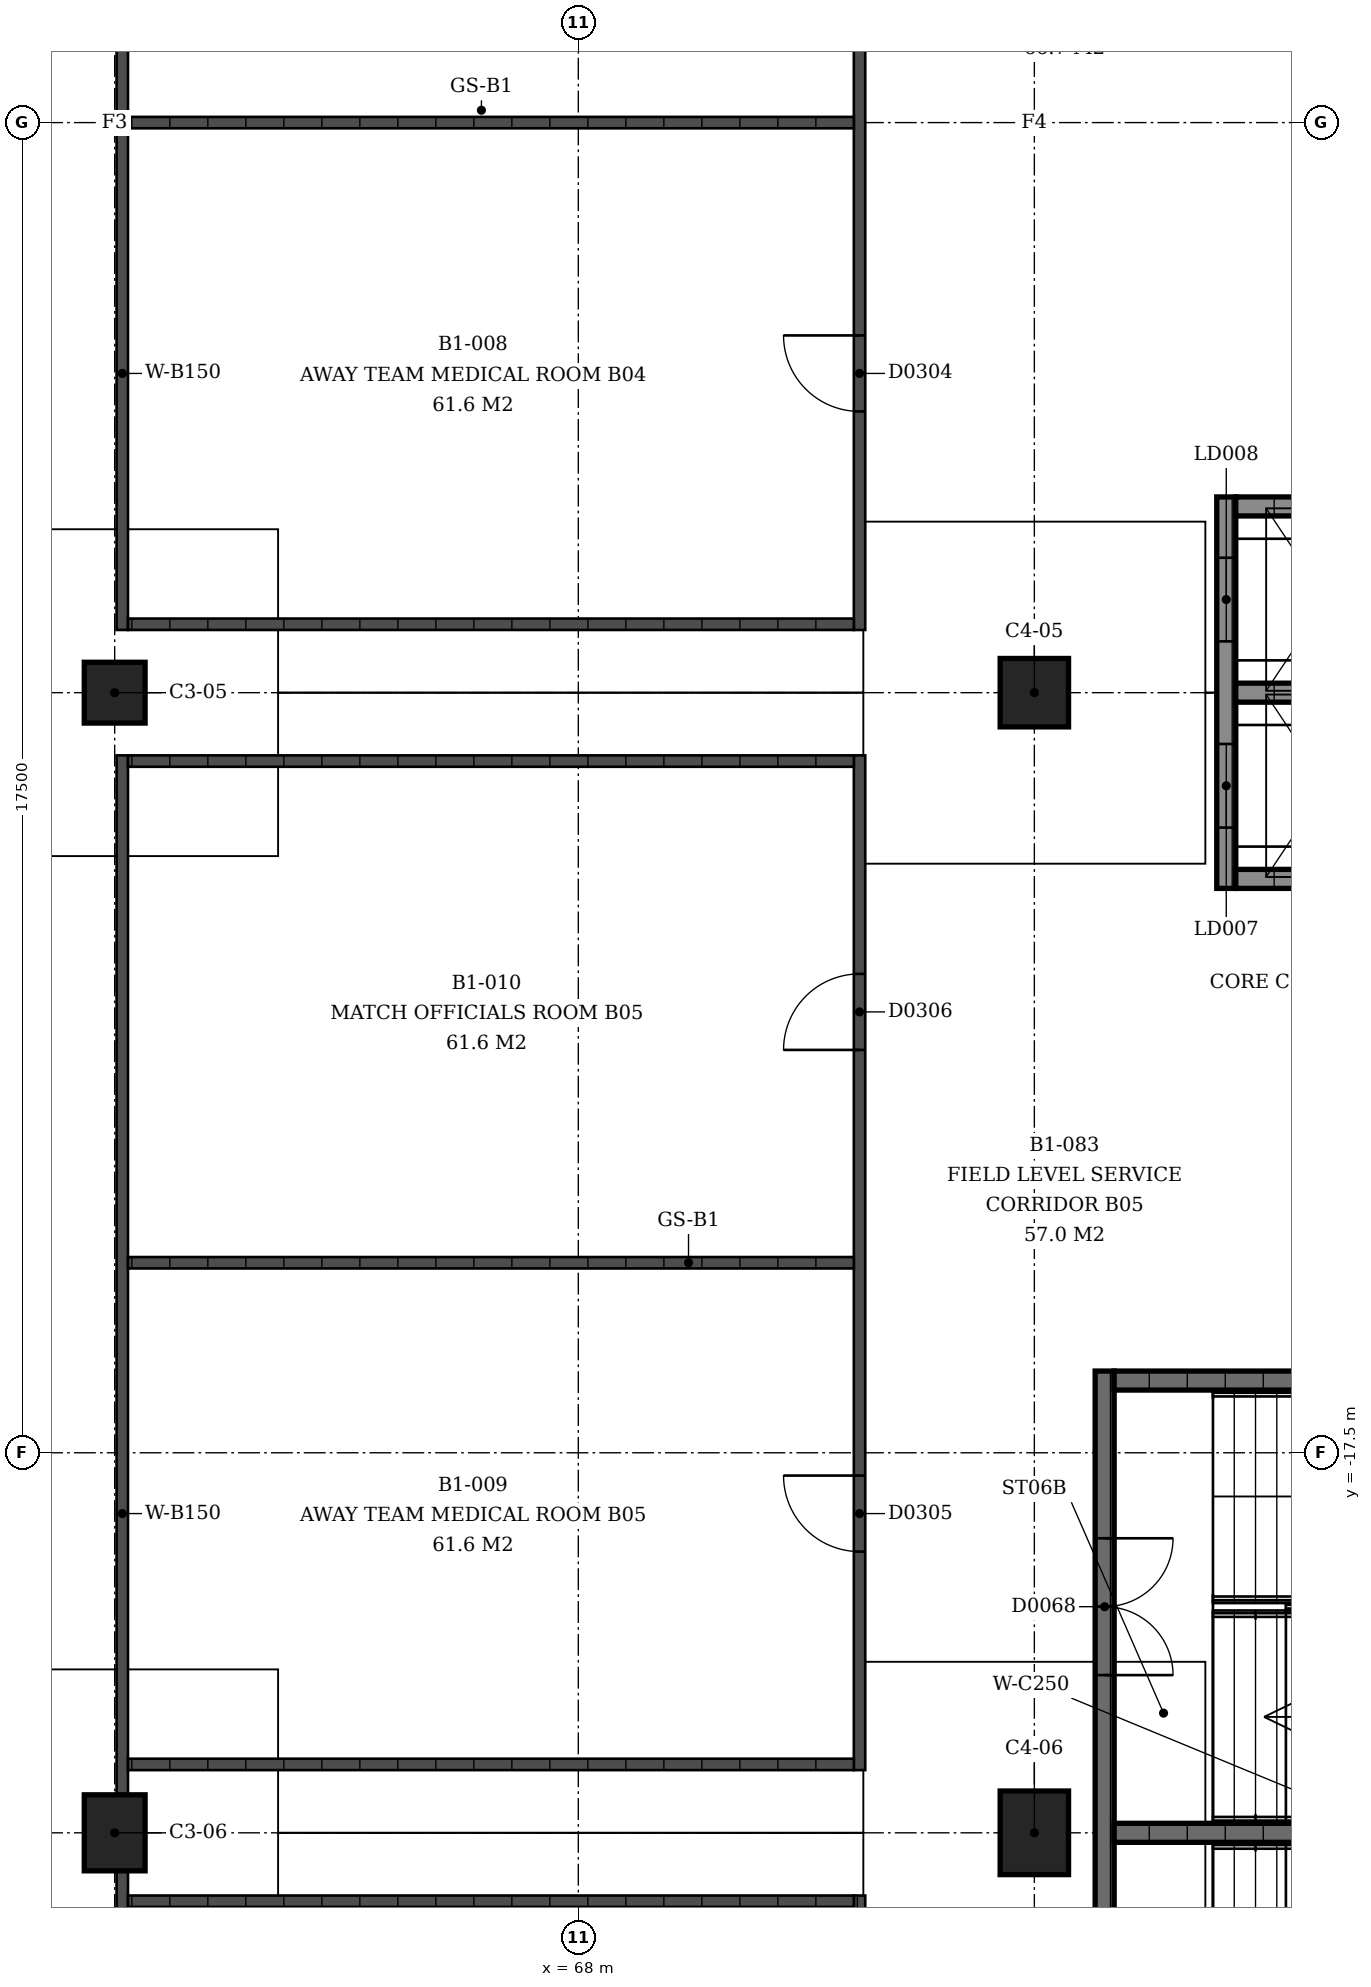
"""IFC4 building model, lengths in metres.
Left out: names, types, materials, properties, quantities, classifications, styles, units other than length and angle.
Written with IfcOpenShell. Run it as: python <this file> out.ifc"""

import sys

from ifc_helpers import new_model, si_unit, direction, frame, frame_2d, origin, origin_2d, place, context, subcontext, project, spatial, rectangle, extrude, element, fill, save


model = new_model("IFC4")
c1 = context("Model", 3, precision=1e-05, world=origin(), true_north=direction((0.0, 1.0)))
c2 = subcontext(c1, "Body", "Model", "MODEL_VIEW")
j1 = project(units=[si_unit("LENGTHUNIT", "METRE"), si_unit("PLANEANGLEUNIT", "RADIAN")], contexts=[c1])
p1 = place(None, origin())
s1 = spatial("IfcSite", under=j1, at=p1, CompositionType="ELEMENT")
p2 = place(p1, origin())
s2 = spatial("IfcBuilding", under=s1, at=p2, CompositionType="ELEMENT")
p3 = place(p2, frame((0.0, 0.0, -4.5)))
s3 = spatial("IfcBuildingStorey", under=s2, at=p3, CompositionType="ELEMENT", Elevation=-4.5)
p4 = place(p3, frame((61.9, -7.5, 0.0), z_axis=(0.0, 0.0, 1.0), x_axis=(0.0, 1.0, 0.0)))
e1 = element("IfcColumn", 1, at=p4, inside=s3, PredefinedType="COLUMN", context=c2, shape_type="SweptSolid", body=[
    extrude(rectangle(XDim=0.8, YDim=0.8, at=origin_2d()), origin(), (0.0, 0.0, 1.0), 4.5),
])
p5 = place(p3, frame((74.0, -7.5, 0.0), z_axis=(0.0, 0.0, 1.0), x_axis=(0.0, 1.0, 0.0)))
e2 = element("IfcColumn", 2, at=p5, inside=s3, PredefinedType="COLUMN", context=c2, shape_type="SweptSolid", body=[
    extrude(rectangle(XDim=0.9, YDim=0.9, at=origin_2d()), origin(), (0.0, 0.0, 1.0), 4.5),
])
p6 = place(p3, frame((61.9, -22.5, 0.0), z_axis=(0.0, 0.0, 1.0), x_axis=(0.0, 1.0, 0.0)))
e3 = element("IfcColumn", 3, at=p6, inside=s3, PredefinedType="COLUMN", context=c2, shape_type="SweptSolid", body=[
    extrude(rectangle(XDim=1.0, YDim=0.8, at=origin_2d()), origin(), (0.0, 0.0, 1.0), 4.5),
])
p7 = place(p3, frame((74.0, -22.5, 0.0), z_axis=(0.0, 0.0, 1.0), x_axis=(0.0, 1.0, 0.0)))
e4 = element("IfcColumn", 4, at=p7, inside=s3, PredefinedType="COLUMN", context=c2, shape_type="SweptSolid", body=[
    extrude(rectangle(XDim=1.1, YDim=0.9, at=origin_2d()), origin(), (0.0, 0.0, 1.0), 4.5),
])
p8 = place(p3, frame((74.925, -28.575, 0.0), z_axis=(0.0, 0.0, 1.0), x_axis=(0.0, 1.0, 0.0)))
e5 = element("IfcWall", 5, at=p8, inside=s3, PredefinedType="SHEAR", context=c2, shape_type="SweptSolid", body=[
    extrude(rectangle(XDim=12.15, YDim=0.25, at=frame_2d((6.075, 0.0))), origin(), (0.0, 0.0, 1.0), 4.09),
])
p9 = place(p8, frame((2.2, 0.0, 0.0)))
e6 = element("IfcOpeningElement", 6, at=p9, cuts=e5, PredefinedType="OPENING", context=c2, shape_type="SweptSolid", body=[
    extrude(rectangle(XDim=1.8, YDim=2.1, at=frame_2d((0.9, 1.05))), frame((0.0, 0.125, 0.0), z_axis=(0.0, -1.0, 0.0), x_axis=(1.0, 0.0, 0.0)), (0.0, 0.0, 1.0), 0.25),
])
p10 = place(p8, frame((8.15, 0.0, 0.0)))
e7 = element("IfcOpeningElement", 7, at=p10, cuts=e5, PredefinedType="OPENING", context=c2, shape_type="SweptSolid", body=[
    extrude(rectangle(XDim=1.8, YDim=2.1, at=frame_2d((0.9, 1.05))), frame((0.0, 0.125, 0.0), z_axis=(0.0, -1.0, 0.0), x_axis=(1.0, 0.0, 0.0)), (0.0, 0.0, 1.0), 0.25),
])
for number, where, z_axis, x_axis in (
    (8, (75.05, -16.55, 0.0), (0.0, 0.0, 1.0), (1.0, 0.0, 0.0)),
    (9, (75.05, -22.5, 0.0), (0.0, 0.0, 1.0), (1.0, 0.0, 0.0)),
):
    element("IfcWall", number, at=place(p3, frame(where, z_axis=z_axis, x_axis=x_axis)), inside=s3, PredefinedType="SHEAR", context=c2, shape_type="SweptSolid", body=[
        extrude(rectangle(XDim=7.46, YDim=0.25, at=frame_2d((3.73, 0.0))), origin(), (0.0, 0.0, 1.0), 4.09),
    ])
p11 = place(p3, frame((76.525, -10.075, -1.2), z_axis=(0.0, 0.0, 1.0), x_axis=(0.0, 1.0, 0.0)))
e10 = element("IfcWall", 10, at=p11, inside=s3, PredefinedType="SHEAR", context=c2, shape_type="SweptSolid", body=[
    extrude(rectangle(XDim=5.15, YDim=0.25, at=frame_2d((2.575, 0.0))), origin(), (0.0, 0.0, 1.0), 5.29),
])
p12 = place(p11, frame((0.8, 0.0, 1.2)))
e11 = element("IfcOpeningElement", 11, at=p12, cuts=e10, PredefinedType="OPENING", context=c2, shape_type="SweptSolid", body=[
    extrude(rectangle(XDim=1.1, YDim=2.1, at=frame_2d((0.55, 1.05))), frame((0.0, 0.125, 0.0), z_axis=(0.0, -1.0, 0.0), x_axis=(1.0, 0.0, 0.0)), (0.0, 0.0, 1.0), 0.25),
])
p13 = place(p11, frame((3.25, 0.0, 1.2)))
e12 = element("IfcOpeningElement", 12, at=p13, cuts=e10, PredefinedType="OPENING", context=c2, shape_type="SweptSolid", body=[
    extrude(rectangle(XDim=1.1, YDim=2.1, at=frame_2d((0.55, 1.05))), frame((0.0, 0.125, 0.0), z_axis=(0.0, -1.0, 0.0), x_axis=(1.0, 0.0, 0.0)), (0.0, 0.0, 1.0), 0.25),
])
for number, where, z_axis, x_axis in (
    (13, (76.65, -9.95, -1.2), (0.0, 0.0, 1.0), (1.0, 0.0, 0.0)),
    (14, (76.65, -5.05, -1.2), (0.0, 0.0, 1.0), (1.0, 0.0, 0.0)),
    (15, (76.65, -7.5, -1.2), (0.0, 0.0, 1.0), (1.0, 0.0, 0.0)),
):
    element("IfcWall", number, at=place(p3, frame(where, z_axis=z_axis, x_axis=x_axis)), inside=s3, PredefinedType="SHEAR", context=c2, shape_type="SweptSolid", body=[
        extrude(rectangle(XDim=3.0, YDim=0.25, at=frame_2d((1.5, 0.0))), origin(), (0.0, 0.0, 1.0), 5.29),
    ])
p14 = place(p3, frame((62.0, 7.0, 0.0), z_axis=(0.0, 0.0, 1.0), x_axis=(0.0, -1.0, 0.0)))
e16 = element("IfcWall", 16, at=p14, inside=s3, PredefinedType="SOLIDWALL", context=c2, shape_type="SweptSolid", body=[
    extrude(rectangle(XDim=13.675, YDim=0.15, at=frame_2d((6.837, 0.0))), origin(), (0.0, 0.0, 1.0), 3.0),
])
p15 = place(p3, frame((71.7, 6.675, 0.0), z_axis=(0.0, 0.0, 1.0), x_axis=(0.0, -1.0, 0.0)))
e17 = element("IfcWall", 17, at=p15, inside=s3, PredefinedType="SOLIDWALL", context=c2, shape_type="SweptSolid", body=[
    extrude(rectangle(XDim=13.35, YDim=0.15, at=frame_2d((6.675, 0.0))), origin(), (0.0, 0.0, 1.0), 3.0),
])
p16 = place(p15, frame((2.875, 0.0, 0.0)))
e18 = element("IfcOpeningElement", 18, at=p16, cuts=e17, PredefinedType="OPENING", context=c2, shape_type="SweptSolid", body=[
    extrude(rectangle(XDim=1.0, YDim=2.1, at=frame_2d((0.5, 1.05))), frame((0.0, 0.075, 0.0), z_axis=(0.0, -1.0, 0.0), x_axis=(1.0, 0.0, 0.0)), (0.0, 0.0, 1.0), 0.15),
])
p17 = place(p15, frame((9.475, 0.0, 0.0)))
e19 = element("IfcOpeningElement", 19, at=p17, cuts=e17, PredefinedType="OPENING", context=c2, shape_type="SweptSolid", body=[
    extrude(rectangle(XDim=1.0, YDim=2.1, at=frame_2d((0.5, 1.05))), frame((0.0, 0.075, 0.0), z_axis=(0.0, -1.0, 0.0), x_axis=(1.0, 0.0, 0.0)), (0.0, 0.0, 1.0), 0.15),
])
for number, where, z_axis, x_axis in (
    (20, (62.075, 0.0, 0.0), (0.0, 0.0, 1.0), (1.0, 0.0, 0.0)),
    (21, (62.075, -6.6, 0.0), (0.0, 0.0, 1.0), (1.0, 0.0, 0.0)),
):
    element("IfcWall", number, at=place(p3, frame(where, z_axis=z_axis, x_axis=x_axis)), inside=s3, PredefinedType="SOLIDWALL", context=c2, shape_type="SweptSolid", body=[
        extrude(rectangle(XDim=9.55, YDim=0.15, at=frame_2d((4.775, 0.0))), origin(), (0.0, 0.0, 1.0), 3.0),
    ])
p18 = place(p3, frame((62.0, -22.0, 0.0), z_axis=(0.0, 0.0, 1.0), x_axis=(0.0, 1.0, 0.0)))
e22 = element("IfcWall", 22, at=p18, inside=s3, PredefinedType="SOLIDWALL", context=c2, shape_type="SweptSolid", body=[
    extrude(rectangle(XDim=13.675, YDim=0.15, at=frame_2d((6.837, 0.0))), origin(), (0.0, 0.0, 1.0), 3.0),
])
p19 = place(p3, frame((71.7, -21.675, 0.0), z_axis=(0.0, 0.0, 1.0), x_axis=(0.0, 1.0, 0.0)))
e23 = element("IfcWall", 23, at=p19, inside=s3, PredefinedType="SOLIDWALL", context=c2, shape_type="SweptSolid", body=[
    extrude(rectangle(XDim=13.35, YDim=0.15, at=frame_2d((6.675, 0.0))), origin(), (0.0, 0.0, 1.0), 3.0),
])
p20 = place(p19, frame((2.875, 0.0, 0.0)))
e24 = element("IfcOpeningElement", 24, at=p20, cuts=e23, PredefinedType="OPENING", context=c2, shape_type="SweptSolid", body=[
    extrude(rectangle(XDim=1.0, YDim=2.1, at=frame_2d((0.5, 1.05))), frame((0.0, 0.075, 0.0), z_axis=(0.0, -1.0, 0.0), x_axis=(1.0, 0.0, 0.0)), (0.0, 0.0, 1.0), 0.15),
])
p21 = place(p19, frame((9.475, 0.0, 0.0)))
e25 = element("IfcOpeningElement", 25, at=p21, cuts=e23, PredefinedType="OPENING", context=c2, shape_type="SweptSolid", body=[
    extrude(rectangle(XDim=1.0, YDim=2.1, at=frame_2d((0.5, 1.05))), frame((0.0, 0.075, 0.0), z_axis=(0.0, -1.0, 0.0), x_axis=(1.0, 0.0, 0.0)), (0.0, 0.0, 1.0), 0.15),
])
for number, where, z_axis, x_axis in (
    (26, (62.075, -21.6, 0.0), (0.0, 0.0, 1.0), (1.0, 0.0, 0.0)),
    (27, (62.075, -15.0, 0.0), (0.0, 0.0, 1.0), (1.0, 0.0, 0.0)),
    (28, (62.075, -8.4, 0.0), (0.0, 0.0, 1.0), (1.0, 0.0, 0.0)),
):
    element("IfcWall", number, at=place(p3, frame(where, z_axis=z_axis, x_axis=x_axis)), inside=s3, PredefinedType="SOLIDWALL", context=c2, shape_type="SweptSolid", body=[
        extrude(rectangle(XDim=9.55, YDim=0.15, at=frame_2d((4.775, 0.0))), origin(), (0.0, 0.0, 1.0), 3.0),
    ])
p22 = place(p3, frame((62.0, -23.0, 0.0), z_axis=(0.0, 0.0, 1.0), x_axis=(0.0, -1.0, 0.0)))
e29 = element("IfcWall", 29, at=p22, inside=s3, PredefinedType="SOLIDWALL", context=c2, shape_type="SweptSolid", body=[
    extrude(rectangle(XDim=13.675, YDim=0.15, at=frame_2d((6.837, 0.0))), origin(), (0.0, 0.0, 1.0), 3.0),
])
p23 = place(p3, frame((71.7, -23.325, 0.0), z_axis=(0.0, 0.0, 1.0), x_axis=(0.0, -1.0, 0.0)))
e30 = element("IfcWall", 30, at=p23, inside=s3, PredefinedType="SOLIDWALL", context=c2, shape_type="SweptSolid", body=[
    extrude(rectangle(XDim=13.35, YDim=0.15, at=frame_2d((6.675, 0.0))), origin(), (0.0, 0.0, 1.0), 3.0),
])
p24 = place(p23, frame((2.875, 0.0, 0.0)))
e31 = element("IfcOpeningElement", 31, at=p24, cuts=e30, PredefinedType="OPENING", context=c2, shape_type="SweptSolid", body=[
    extrude(rectangle(XDim=1.0, YDim=2.1, at=frame_2d((0.5, 1.05))), frame((0.0, 0.075, 0.0), z_axis=(0.0, -1.0, 0.0), x_axis=(1.0, 0.0, 0.0)), (0.0, 0.0, 1.0), 0.15),
])
p25 = place(p23, frame((9.475, 0.0, 0.0)))
e32 = element("IfcOpeningElement", 32, at=p25, cuts=e30, PredefinedType="OPENING", context=c2, shape_type="SweptSolid", body=[
    extrude(rectangle(XDim=1.0, YDim=2.1, at=frame_2d((0.5, 1.05))), frame((0.0, 0.075, 0.0), z_axis=(0.0, -1.0, 0.0), x_axis=(1.0, 0.0, 0.0)), (0.0, 0.0, 1.0), 0.15),
])
p26 = place(p3, frame((62.075, -23.4, 0.0), z_axis=(0.0, 0.0, 1.0), x_axis=(1.0, 0.0, 0.0)))
e33 = element("IfcWall", 33, at=p26, inside=s3, PredefinedType="SOLIDWALL", context=c2, shape_type="SweptSolid", body=[
    extrude(rectangle(XDim=9.55, YDim=0.15, at=frame_2d((4.775, 0.0))), origin(), (0.0, 0.0, 1.0), 3.0),
])
p27 = place(p10, origin())
e34 = element("IfcDoor", 34, at=p27, inside=s3, OperationType="DOUBLE_DOOR_SINGLE_SWING", PredefinedType="DOOR", context=c2, shape_type="SweptSolid", body=[
    extrude(rectangle(XDim=1.8, YDim=2.1, at=frame_2d((0.9, 1.05))), frame((0.0, 0.025, 0.0), z_axis=(0.0, -1.0, 0.0), x_axis=(1.0, 0.0, 0.0)), (0.0, 0.0, 1.0), 0.05),
])
fill(e7, e34)
p28 = place(p12, origin())
e35 = element("IfcDoor", 35, at=p28, inside=s3, OperationType="SLIDING_TO_LEFT", PredefinedType="DOOR", context=c2, shape_type="SweptSolid", body=[
    extrude(rectangle(XDim=1.1, YDim=2.1, at=frame_2d((0.55, 1.05))), frame((0.0, 0.025, 0.0), z_axis=(0.0, -1.0, 0.0), x_axis=(1.0, 0.0, 0.0)), (0.0, 0.0, 1.0), 0.05),
])
fill(e11, e35)
p29 = place(p13, origin())
e36 = element("IfcDoor", 36, at=p29, inside=s3, OperationType="SLIDING_TO_LEFT", PredefinedType="DOOR", context=c2, shape_type="SweptSolid", body=[
    extrude(rectangle(XDim=1.1, YDim=2.1, at=frame_2d((0.55, 1.05))), frame((0.0, 0.025, 0.0), z_axis=(0.0, -1.0, 0.0), x_axis=(1.0, 0.0, 0.0)), (0.0, 0.0, 1.0), 0.05),
])
fill(e12, e36)
p30 = place(p17, origin())
e37 = element("IfcDoor", 37, at=p30, inside=s3, OperationType="SINGLE_SWING_LEFT", PredefinedType="DOOR", context=c2, shape_type="SweptSolid", body=[
    extrude(rectangle(XDim=1.0, YDim=2.1, at=frame_2d((0.5, 1.05))), frame((0.0, 0.025, 0.0), z_axis=(0.0, -1.0, 0.0), x_axis=(1.0, 0.0, 0.0)), (0.0, 0.0, 1.0), 0.05),
])
fill(e19, e37)
p31 = place(p20, origin())
e38 = element("IfcDoor", 38, at=p31, inside=s3, OperationType="SINGLE_SWING_LEFT", PredefinedType="DOOR", context=c2, shape_type="SweptSolid", body=[
    extrude(rectangle(XDim=1.0, YDim=2.1, at=frame_2d((0.5, 1.05))), frame((0.0, 0.025, 0.0), z_axis=(0.0, -1.0, 0.0), x_axis=(1.0, 0.0, 0.0)), (0.0, 0.0, 1.0), 0.05),
])
fill(e24, e38)
p32 = place(p21, origin())
e39 = element("IfcDoor", 39, at=p32, inside=s3, OperationType="SINGLE_SWING_RIGHT", PredefinedType="DOOR", context=c2, shape_type="SweptSolid", body=[
    extrude(rectangle(XDim=1.0, YDim=2.1, at=frame_2d((0.5, 1.05))), frame((0.0, 0.025, 0.0), z_axis=(0.0, -1.0, 0.0), x_axis=(1.0, 0.0, 0.0)), (0.0, 0.0, 1.0), 0.05),
])
fill(e25, e39)
save(model, sys.argv[1])
